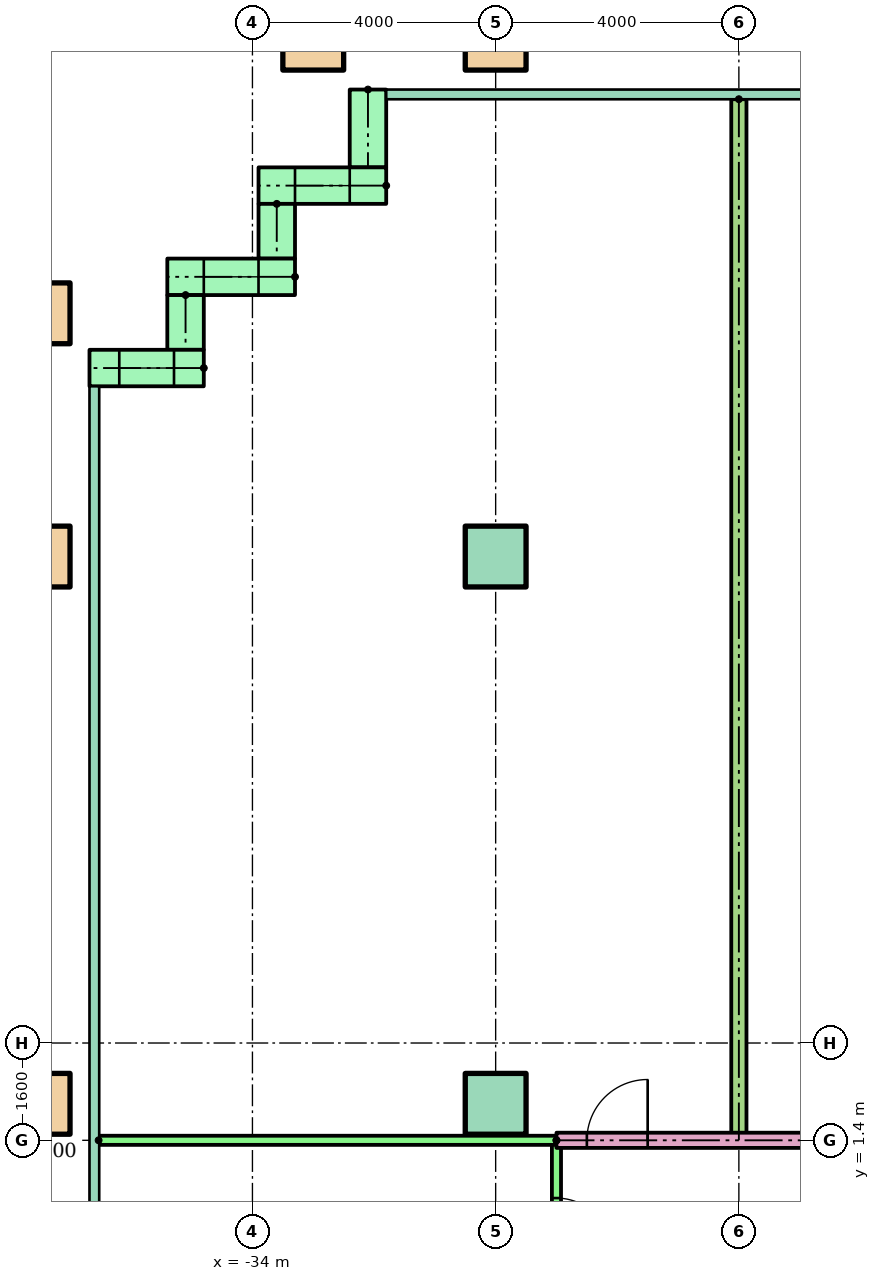
"""IFC4 building model, lengths in metres.
Left out: names, types, materials, properties, quantities, classifications, styles, units other than length and angle.
Written with IfcOpenShell. Run it as: python <this file> out.ifc"""

import sys

from ifc_helpers import new_model, si_unit, direction, frame, frame_2d, origin, origin_2d, place, context, subcontext, project, spatial, rectangle, hollow_rectangle, extrude, element, fill, save


model = new_model("IFC4")
c1 = context("Model", 3, precision=1e-05, world=origin(), true_north=direction((0.0, 1.0)))
c2 = subcontext(c1, "Body", "Model", "MODEL_VIEW")
j1 = project(units=[si_unit("LENGTHUNIT", "METRE"), si_unit("PLANEANGLEUNIT", "RADIAN")], contexts=[c1])
p1 = place(None, origin())
s1 = spatial("IfcSite", under=j1, at=p1, CompositionType="ELEMENT")
p2 = place(p1, origin())
s2 = spatial("IfcBuilding", under=s1, at=p2, CompositionType="ELEMENT")
p3 = place(p2, frame((0.0, 0.0, 33.8)))
s3 = spatial("IfcBuildingStorey", under=s2, at=p3, CompositionType="ELEMENT", Elevation=33.8)
p4 = place(p3, frame((-37.5, 2.0, 0.0)))
e1 = element("IfcColumn", 1, at=p4, inside=s3, PredefinedType="COLUMN", context=c2, shape_type="SweptSolid", body=[
    extrude(hollow_rectangle(XDim=1.0, YDim=1.0, WallThickness=0.05, at=origin_2d()), origin(), (0.0, 0.0, 1.0), 3.9),
])
p5 = place(p3, frame((-30.0, 2.0, 0.0)))
e2 = element("IfcColumn", 2, at=p5, inside=s3, PredefinedType="COLUMN", context=c2, shape_type="SweptSolid", body=[
    extrude(rectangle(XDim=1.0, YDim=1.0, at=origin_2d()), origin(), (0.0, 0.0, 1.0), 3.9),
])
p6 = place(p3, frame((-37.5, 11.0, 0.0)))
e3 = element("IfcColumn", 3, at=p6, inside=s3, PredefinedType="COLUMN", context=c2, shape_type="SweptSolid", body=[
    extrude(hollow_rectangle(XDim=1.0, YDim=1.0, WallThickness=0.05, at=origin_2d()), origin(), (0.0, 0.0, 1.0), 3.9),
])
p7 = place(p3, frame((-30.0, 11.0, 0.0)))
e4 = element("IfcColumn", 4, at=p7, inside=s3, PredefinedType="COLUMN", context=c2, shape_type="SweptSolid", body=[
    extrude(rectangle(XDim=1.0, YDim=1.0, at=origin_2d()), origin(), (0.0, 0.0, 1.0), 3.9),
])
for number, where in (
    (5, (-37.5, 15.0, 0.0)),
    (6, (-33.0, 19.5, 0.0)),
    (7, (-30.0, 19.5, 0.0)),
):
    element("IfcColumn", number, at=place(p3, frame(where)), inside=s3, PredefinedType="COLUMN", context=c2, shape_type="SweptSolid", body=[
        extrude(hollow_rectangle(XDim=1.0, YDim=1.0, WallThickness=0.05, at=origin_2d()), origin(), (0.0, 0.0, 1.0), 3.9),
    ])
p8 = place(p3, frame((-32.1, 18.68, 0.0), z_axis=(0.0, 0.0, 1.0), x_axis=(0.0, -1.0, 0.0)))
e8 = element("IfcWall", 8, at=p8, inside=s3, PredefinedType="STANDARD", context=c2, shape_type="SweptSolid", body=[
    extrude(rectangle(XDim=1.28, YDim=0.6, at=frame_2d((0.64, 0.0))), origin(), (0.0, 0.0, 1.0), 3.6),
])
p9 = place(p3, frame((-31.8, 17.1, 0.0), z_axis=(0.0, 0.0, 1.0), x_axis=(-1.0, 0.0, 0.0)))
e9 = element("IfcWall", 9, at=p9, inside=s3, PredefinedType="STANDARD", context=c2, shape_type="SweptSolid", body=[
    extrude(rectangle(XDim=2.1, YDim=0.6, at=frame_2d((1.05, 0.0))), origin(), (0.0, 0.0, 1.0), 3.6),
])
p10 = place(p9, frame((0.6, 0.0, 0.9)))
e10 = element("IfcOpeningElement", 10, at=p10, cuts=e9, PredefinedType="OPENING", context=c2, shape_type="SweptSolid", body=[
    extrude(rectangle(XDim=0.9, YDim=1.8, at=frame_2d((0.45, 0.9))), frame((0.0, 0.31, 0.0), z_axis=(0.0, -1.0, 0.0), x_axis=(1.0, 0.0, 0.0)), (0.0, 0.0, 1.0), 0.62),
])
p11 = place(p3, frame((-33.6, 16.8, 0.0), z_axis=(0.0, 0.0, 1.0), x_axis=(0.0, -1.0, 0.0)))
e11 = element("IfcWall", 11, at=p11, inside=s3, PredefinedType="STANDARD", context=c2, shape_type="SweptSolid", body=[
    extrude(rectangle(XDim=0.9, YDim=0.6, at=frame_2d((0.45, 0.0))), origin(), (0.0, 0.0, 1.0), 3.6),
])
p12 = place(p3, frame((-33.3, 15.6, 0.0), z_axis=(0.0, 0.0, 1.0), x_axis=(-1.0, 0.0, 0.0)))
e12 = element("IfcWall", 12, at=p12, inside=s3, PredefinedType="STANDARD", context=c2, shape_type="SweptSolid", body=[
    extrude(rectangle(XDim=2.1, YDim=0.6, at=frame_2d((1.05, 0.0))), origin(), (0.0, 0.0, 1.0), 3.6),
])
p13 = place(p12, frame((0.6, 0.0, 0.9)))
e13 = element("IfcOpeningElement", 13, at=p13, cuts=e12, PredefinedType="OPENING", context=c2, shape_type="SweptSolid", body=[
    extrude(rectangle(XDim=0.9, YDim=1.8, at=frame_2d((0.45, 0.9))), frame((0.0, 0.31, 0.0), z_axis=(0.0, -1.0, 0.0), x_axis=(1.0, 0.0, 0.0)), (0.0, 0.0, 1.0), 0.62),
])
p14 = place(p3, frame((-35.1, 15.3, 0.0), z_axis=(0.0, 0.0, 1.0), x_axis=(0.0, -1.0, 0.0)))
e14 = element("IfcWall", 14, at=p14, inside=s3, PredefinedType="STANDARD", context=c2, shape_type="SweptSolid", body=[
    extrude(rectangle(XDim=0.9, YDim=0.6, at=frame_2d((0.45, 0.0))), origin(), (0.0, 0.0, 1.0), 3.6),
])
p15 = place(p3, frame((-34.8, 14.1, 0.0), z_axis=(0.0, 0.0, 1.0), x_axis=(-1.0, 0.0, 0.0)))
e15 = element("IfcWall", 15, at=p15, inside=s3, PredefinedType="STANDARD", context=c2, shape_type="SweptSolid", body=[
    extrude(rectangle(XDim=1.88, YDim=0.6, at=frame_2d((0.94, 0.0))), origin(), (0.0, 0.0, 1.0), 3.6),
])
p16 = place(p15, frame((0.49, 0.0, 0.9)))
e16 = element("IfcOpeningElement", 16, at=p16, cuts=e15, PredefinedType="OPENING", context=c2, shape_type="SweptSolid", body=[
    extrude(rectangle(XDim=0.9, YDim=1.8, at=frame_2d((0.45, 0.9))), frame((0.0, 0.31, 0.0), z_axis=(0.0, -1.0, 0.0), x_axis=(1.0, 0.0, 0.0)), (0.0, 0.0, 1.0), 0.62),
])
p17 = place(p3, frame((-29.0, 1.4, 0.0), z_axis=(0.0, 0.0, 1.0), x_axis=(0.0, -1.0, 0.0)))
e17 = element("IfcWall", 17, at=p17, inside=s3, PredefinedType="PARTITIONING", context=c2, shape_type="SweptSolid", body=[
    extrude(rectangle(XDim=2.8, YDim=0.15, at=frame_2d((1.4, 0.0))), origin(), (0.0, 0.0, 1.0), 3.1),
])
p18 = place(p17, frame((0.95, 0.0, 0.0)))
e18 = element("IfcOpeningElement", 18, at=p18, cuts=e17, PredefinedType="OPENING", context=c2, shape_type="SweptSolid", body=[
    extrude(rectangle(XDim=0.9, YDim=2.1, at=frame_2d((0.45, 1.05))), frame((0.0, 0.085, 0.0), z_axis=(0.0, -1.0, 0.0), x_axis=(1.0, 0.0, 0.0)), (0.0, 0.0, 1.0), 0.17),
])
p19 = place(p3, frame((-29.0, 1.4, 0.0)))
e19 = element("IfcWall", 19, at=p19, inside=s3, PredefinedType="PARTITIONING", context=c2, shape_type="SweptSolid", body=[
    extrude(rectangle(XDim=15.0, YDim=0.25, at=frame_2d((7.5, 0.0))), origin(), (0.0, 0.0, 1.0), 3.1),
])
p20 = place(p19, frame((12.5, 0.0, 0.0)))
e20 = element("IfcOpeningElement", 20, at=p20, cuts=e19, PredefinedType="OPENING", context=c2, shape_type="SweptSolid", body=[
    extrude(rectangle(XDim=1.0, YDim=2.1, at=frame_2d((0.5, 1.05))), frame((0.0, 0.135, 0.0), z_axis=(0.0, -1.0, 0.0), x_axis=(1.0, 0.0, 0.0)), (0.0, 0.0, 1.0), 0.27),
])
p21 = place(p19, frame((0.5, 0.0, 0.0)))
e21 = element("IfcOpeningElement", 21, at=p21, cuts=e19, PredefinedType="OPENING", context=c2, shape_type="SweptSolid", body=[
    extrude(rectangle(XDim=1.0, YDim=2.1, at=frame_2d((0.5, 1.05))), frame((0.0, 0.135, 0.0), z_axis=(0.0, -1.0, 0.0), x_axis=(1.0, 0.0, 0.0)), (0.0, 0.0, 1.0), 0.27),
])
p22 = place(p3, frame((-36.53, 1.4, 0.0)))
e22 = element("IfcWall", 22, at=p22, inside=s3, PredefinedType="PARTITIONING", context=c2, shape_type="SweptSolid", body=[
    extrude(rectangle(XDim=7.53, YDim=0.15, at=frame_2d((3.765, 0.0))), origin(), (0.0, 0.0, 1.0), 3.1),
])
p23 = place(p3, frame((-26.0, 18.521, 0.0), z_axis=(0.0, 0.0, 1.0), x_axis=(0.0, -1.0, 0.0)))
e23 = element("IfcWall", 23, at=p23, inside=s3, PredefinedType="PARTITIONING", context=c2, shape_type="SweptSolid", body=[
    extrude(rectangle(XDim=17.121, YDim=0.25, at=frame_2d((8.561, 0.0))), origin(), (0.0, 0.0, 1.0), 3.1),
])
p24 = place(p10, origin())
e24 = element("IfcWindow", 24, at=p24, inside=s3, PartitioningType="SINGLE_PANEL", PredefinedType="WINDOW", context=c2, shape_type="SweptSolid", body=[
    extrude(rectangle(XDim=0.9, YDim=1.8, at=frame_2d((0.45, 0.9))), frame((0.0, 0.03, 0.0), z_axis=(0.0, -1.0, 0.0), x_axis=(1.0, 0.0, 0.0)), (0.0, 0.0, 1.0), 0.06),
])
fill(e10, e24)
p25 = place(p13, origin())
e25 = element("IfcWindow", 25, at=p25, inside=s3, PartitioningType="SINGLE_PANEL", PredefinedType="WINDOW", context=c2, shape_type="SweptSolid", body=[
    extrude(rectangle(XDim=0.9, YDim=1.8, at=frame_2d((0.45, 0.9))), frame((0.0, 0.03, 0.0), z_axis=(0.0, -1.0, 0.0), x_axis=(1.0, 0.0, 0.0)), (0.0, 0.0, 1.0), 0.06),
])
fill(e13, e25)
p26 = place(p16, origin())
e26 = element("IfcWindow", 26, at=p26, inside=s3, PartitioningType="SINGLE_PANEL", PredefinedType="WINDOW", context=c2, shape_type="SweptSolid", body=[
    extrude(rectangle(XDim=0.9, YDim=1.8, at=frame_2d((0.45, 0.9))), frame((0.0, 0.03, 0.0), z_axis=(0.0, -1.0, 0.0), x_axis=(1.0, 0.0, 0.0)), (0.0, 0.0, 1.0), 0.06),
])
fill(e16, e26)
p27 = place(p18, origin())
e27 = element("IfcDoor", 27, at=p27, inside=s3, OperationType="SINGLE_SWING_RIGHT", PredefinedType="DOOR", context=c2, shape_type="SweptSolid", body=[
    extrude(rectangle(XDim=0.9, YDim=2.1, at=frame_2d((0.45, 1.05))), frame((0.0, 0.025, 0.0), z_axis=(0.0, -1.0, 0.0), x_axis=(1.0, 0.0, 0.0)), (0.0, 0.0, 1.0), 0.05),
])
fill(e18, e27)
p28 = place(p21, origin())
e28 = element("IfcDoor", 28, at=p28, inside=s3, OperationType="SINGLE_SWING_RIGHT", PredefinedType="DOOR", context=c2, shape_type="SweptSolid", body=[
    extrude(rectangle(XDim=1.0, YDim=2.1, at=frame_2d((0.5, 1.05))), frame((0.0, 0.025, 0.0), z_axis=(0.0, -1.0, 0.0), x_axis=(1.0, 0.0, 0.0)), (0.0, 0.0, 1.0), 0.05),
])
fill(e21, e28)
save(model, sys.argv[1])
